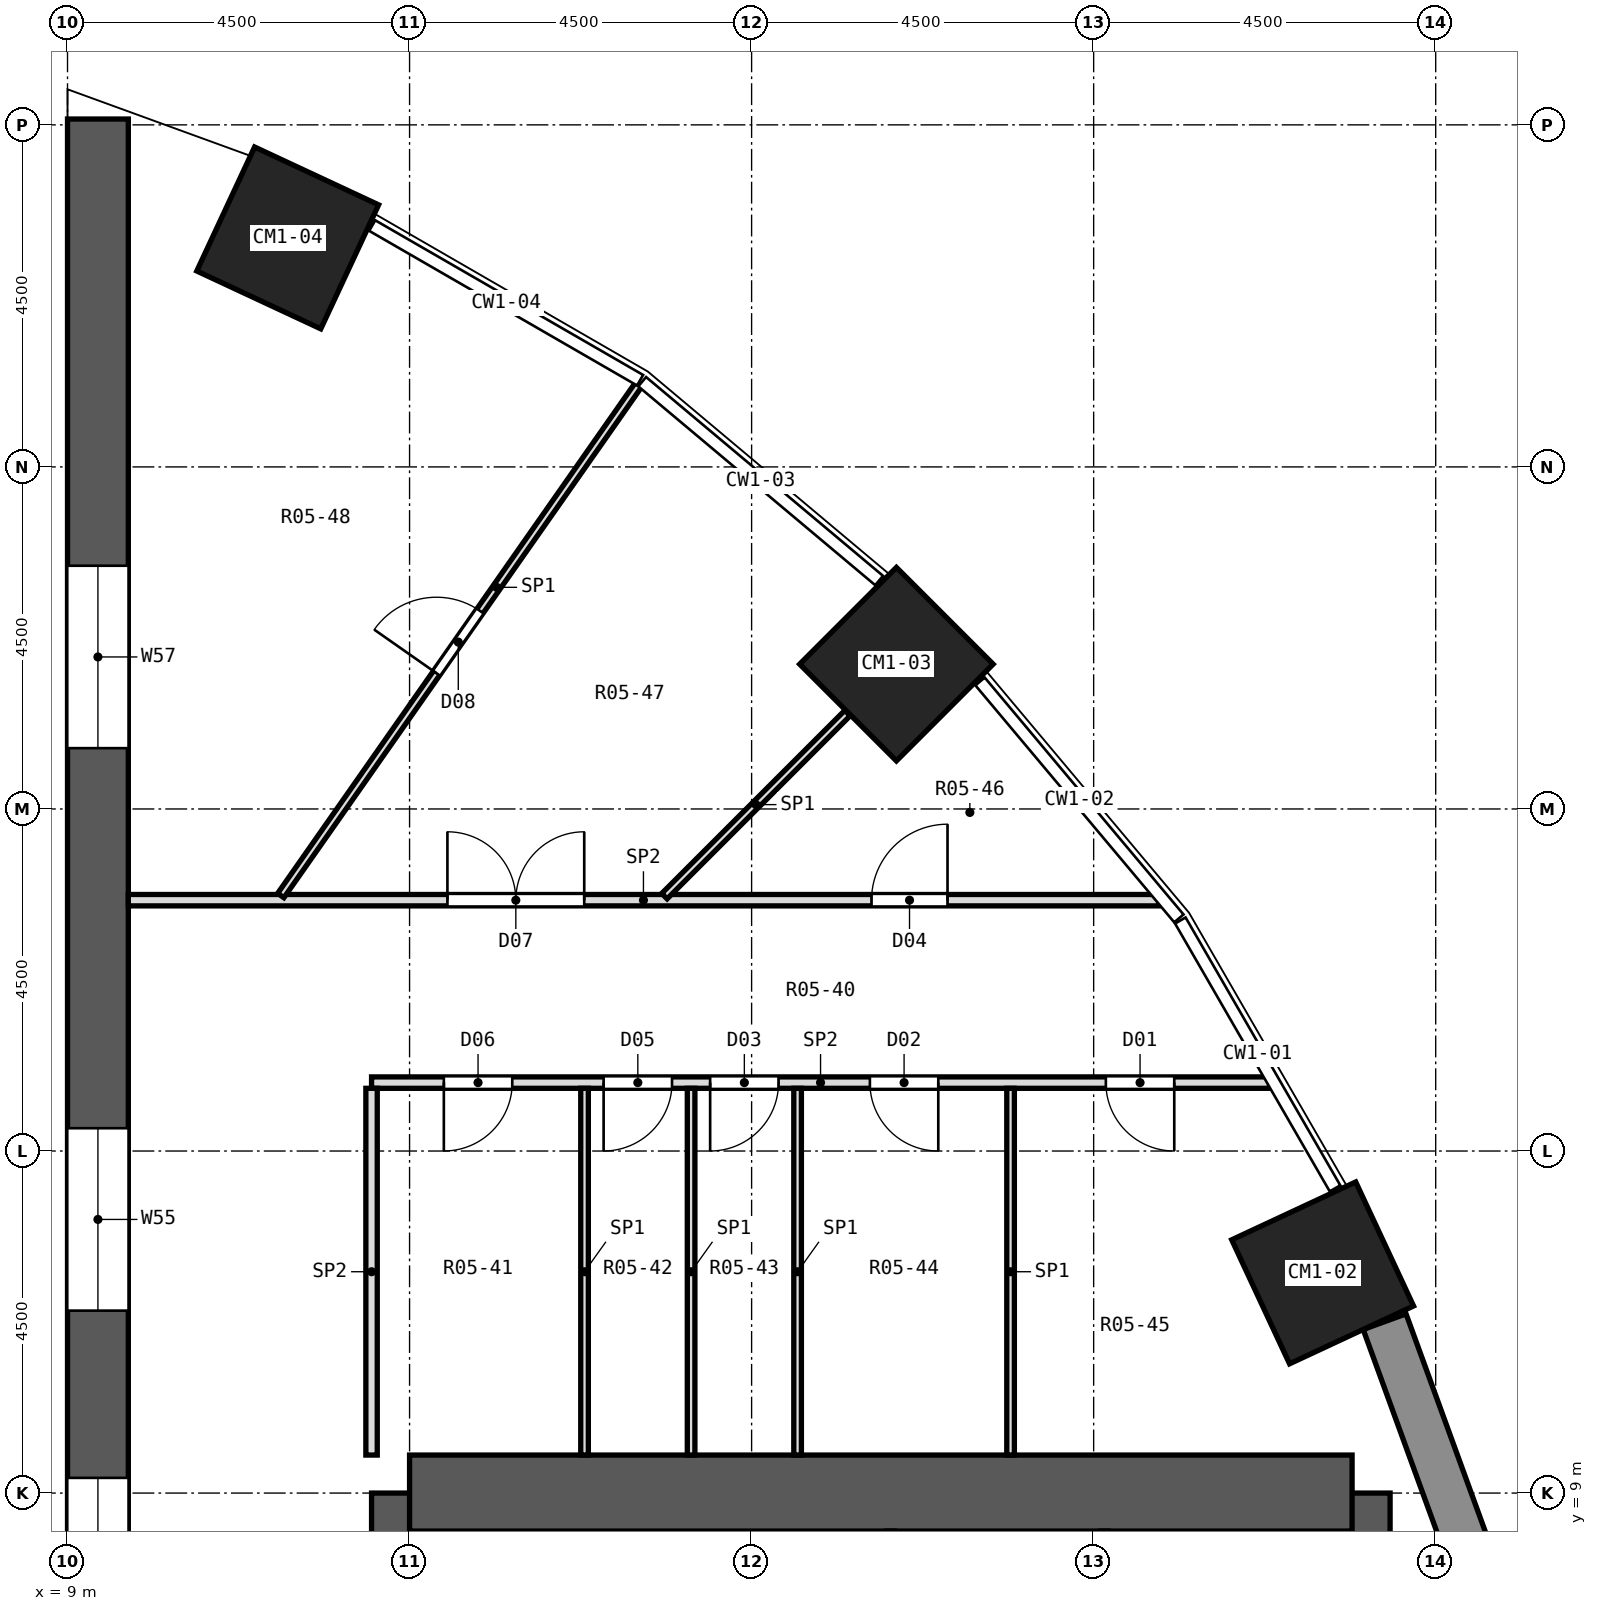
"""IFC4 building model, lengths in metres.
Left out: names, types, materials, properties, quantities, classifications, styles, units other than length and angle.
Written with IfcOpenShell. Run it as: python <this file> out.ifc"""

import sys

from ifc_helpers import new_model, si_unit, direction, frame, frame_2d, origin, origin_2d, place, context, subcontext, project, spatial, polyline, rectangle, outline, extrude, element, fill, save


model = new_model("IFC4")
c1 = context("Model", 3, precision=1e-05, world=origin(), true_north=direction((0.0, 1.0)))
c2 = subcontext(c1, "Body", "Model", "MODEL_VIEW")
j1 = project(units=[si_unit("LENGTHUNIT", "METRE"), si_unit("PLANEANGLEUNIT", "RADIAN")], contexts=[c1])
p1 = place(None, origin())
s1 = spatial("IfcSite", under=j1, at=p1, CompositionType="ELEMENT")
p2 = place(p1, origin())
s2 = spatial("IfcBuilding", under=s1, at=p2, CompositionType="ELEMENT")
p3 = place(p2, frame((0.0, 0.0, 9.2)))
s3 = spatial("IfcBuildingStorey", under=s2, at=p3, CompositionType="ELEMENT", Elevation=9.2)
for number, where, z_axis, x_axis in (
    (1, (25.512, 11.897, 0.0), (0.0, 0.0, 1.0), (0.906, 0.423, 0.0)),
    (2, (19.905, 19.905, 0.0), (0.0, 0.0, 1.0), (0.707, 0.707, 0.0)),
    (3, (11.897, 25.512, 0.0), (0.0, 0.0, 1.0), (0.423, 0.906, 0.0)),
):
    element("IfcColumn", number, at=place(p3, frame(where, z_axis=z_axis, x_axis=x_axis)), inside=s3, PredefinedType="COLUMN", context=c2, shape_type="SweptSolid", body=[
        extrude(rectangle(XDim=1.8, YDim=1.8, at=origin_2d()), origin(), (0.0, 0.0, 1.0), 4.2),
    ])
p4 = place(p3, frame((13.5, -9.0, 0.0), z_axis=(0.0, 0.0, 1.0), x_axis=(0.0, 1.0, 0.0)))
e4 = element("IfcWall", 4, at=p4, inside=s3, PredefinedType="SHEAR", context=c2, shape_type="SweptSolid", body=[
    extrude(rectangle(XDim=18.0, YDim=1.0, at=frame_2d((9.0, 0.0))), origin(), (0.0, 0.0, 1.0), 4.2),
])
p5 = place(p4, frame((15.4, 0.0, 0.0)))
e5 = element("IfcOpeningElement", 5, at=p5, cuts=e4, PredefinedType="OPENING", context=c2, shape_type="SweptSolid", body=[
    extrude(rectangle(XDim=1.2, YDim=2.1, at=frame_2d((0.6, 1.05))), frame((0.0, 0.512, 0.0), z_axis=(0.0, -1.0, 0.0), x_axis=(1.0, 0.0, 0.0)), (0.0, 0.0, 1.0), 1.024),
])
p6 = place(p4, frame((1.4, 0.0, 0.0)))
e6 = element("IfcOpeningElement", 6, at=p6, cuts=e4, PredefinedType="OPENING", context=c2, shape_type="SweptSolid", body=[
    extrude(rectangle(XDim=1.2, YDim=2.1, at=frame_2d((0.6, 1.05))), frame((0.0, 0.512, 0.0), z_axis=(0.0, -1.0, 0.0), x_axis=(1.0, 0.0, 0.0)), (0.0, 0.0, 1.0), 1.024),
])
p7 = place(p4, frame((7.5, 0.0, 0.0)))
e7 = element("IfcOpeningElement", 7, at=p7, cuts=e4, PredefinedType="OPENING", context=c2, shape_type="SweptSolid", body=[
    extrude(rectangle(XDim=3.0, YDim=2.4, at=frame_2d((1.5, 1.2))), frame((0.0, 0.512, 0.0), z_axis=(0.0, -1.0, 0.0), x_axis=(1.0, 0.0, 0.0)), (0.0, 0.0, 1.0), 1.024),
])
p8 = place(p3, frame((25.9, -9.0, 0.0), z_axis=(0.0, 0.0, 1.0), x_axis=(0.0, 1.0, 0.0)))
e8 = element("IfcWall", 8, at=p8, inside=s3, PredefinedType="SHEAR", context=c2, shape_type="SweptSolid", body=[
    extrude(rectangle(XDim=18.0, YDim=1.0, at=frame_2d((9.0, 0.0))), origin(), (0.0, 0.0, 1.0), 4.2),
])
p9 = place(p3, frame((13.5, 9.0, 0.0), z_axis=(0.0, 0.0, 1.0), x_axis=(1.0, 0.0, 0.0)))
e9 = element("IfcWall", 9, at=p9, inside=s3, PredefinedType="SHEAR", context=c2, shape_type="SweptSolid", body=[
    extrude(rectangle(XDim=12.4, YDim=1.0, at=frame_2d((6.2, 0.0))), origin(), (0.0, 0.0, 1.0), 4.2),
])
p10 = place(p3, frame((9.4, -27.077, 0.0), z_axis=(0.0, 0.0, 1.0), x_axis=(0.0, 1.0, 0.0)))
e10 = element("IfcWall", 10, at=p10, inside=s3, PredefinedType="SHEAR", context=c2, shape_type="SweptSolid", body=[
    extrude(rectangle(XDim=54.154, YDim=0.8, at=frame_2d((27.077, 0.0))), origin(), (0.0, 0.0, 1.0), 4.2),
])
p11 = place(p10, frame((13.277, 0.0, 0.9)))
e11 = element("IfcOpeningElement", 11, at=p11, cuts=e10, PredefinedType="OPENING", context=c2, shape_type="SweptSolid", body=[
    extrude(rectangle(XDim=2.4, YDim=2.1, at=frame_2d((1.2, 1.05))), frame((0.0, 0.412, 0.0), z_axis=(0.0, -1.0, 0.0), x_axis=(1.0, 0.0, 0.0)), (0.0, 0.0, 1.0), 0.824),
])
p12 = place(p10, frame((17.877, 0.0, 0.9)))
e12 = element("IfcOpeningElement", 12, at=p12, cuts=e10, PredefinedType="OPENING", context=c2, shape_type="SweptSolid", body=[
    extrude(rectangle(XDim=2.4, YDim=2.1, at=frame_2d((1.2, 1.05))), frame((0.0, 0.412, 0.0), z_axis=(0.0, -1.0, 0.0), x_axis=(1.0, 0.0, 0.0)), (0.0, 0.0, 1.0), 0.824),
])
p13 = place(p10, frame((22.477, 0.0, 0.9)))
e13 = element("IfcOpeningElement", 13, at=p13, cuts=e10, PredefinedType="OPENING", context=c2, shape_type="SweptSolid", body=[
    extrude(rectangle(XDim=2.4, YDim=2.1, at=frame_2d((1.2, 1.05))), frame((0.0, 0.412, 0.0), z_axis=(0.0, -1.0, 0.0), x_axis=(1.0, 0.0, 0.0)), (0.0, 0.0, 1.0), 0.824),
])
p14 = place(p10, frame((29.277, 0.0, 0.9)))
e14 = element("IfcOpeningElement", 14, at=p14, cuts=e10, PredefinedType="OPENING", context=c2, shape_type="SweptSolid", body=[
    extrude(rectangle(XDim=2.4, YDim=2.1, at=frame_2d((1.2, 1.05))), frame((0.0, 0.412, 0.0), z_axis=(0.0, -1.0, 0.0), x_axis=(1.0, 0.0, 0.0)), (0.0, 0.0, 1.0), 0.824),
])
p15 = place(p10, frame((33.877, 0.0, 0.9)))
e15 = element("IfcOpeningElement", 15, at=p15, cuts=e10, PredefinedType="OPENING", context=c2, shape_type="SweptSolid", body=[
    extrude(rectangle(XDim=2.4, YDim=2.1, at=frame_2d((1.2, 1.05))), frame((0.0, 0.412, 0.0), z_axis=(0.0, -1.0, 0.0), x_axis=(1.0, 0.0, 0.0)), (0.0, 0.0, 1.0), 0.824),
])
p16 = place(p10, frame((38.477, 0.0, 0.9)))
e16 = element("IfcOpeningElement", 16, at=p16, cuts=e10, PredefinedType="OPENING", context=c2, shape_type="SweptSolid", body=[
    extrude(rectangle(XDim=2.4, YDim=2.1, at=frame_2d((1.2, 1.05))), frame((0.0, 0.412, 0.0), z_axis=(0.0, -1.0, 0.0), x_axis=(1.0, 0.0, 0.0)), (0.0, 0.0, 1.0), 0.824),
])
p17 = place(p10, frame((5.877, 0.0, 0.9)))
e17 = element("IfcOpeningElement", 17, at=p17, cuts=e10, PredefinedType="OPENING", context=c2, shape_type="SweptSolid", body=[
    extrude(rectangle(XDim=2.4, YDim=2.1, at=frame_2d((1.2, 1.05))), frame((0.0, 0.412, 0.0), z_axis=(0.0, -1.0, 0.0), x_axis=(1.0, 0.0, 0.0)), (0.0, 0.0, 1.0), 0.824),
])
p18 = place(p10, frame((45.877, 0.0, 0.9)))
e18 = element("IfcOpeningElement", 18, at=p18, cuts=e10, PredefinedType="OPENING", context=c2, shape_type="SweptSolid", body=[
    extrude(rectangle(XDim=2.4, YDim=2.1, at=frame_2d((1.2, 1.05))), frame((0.0, 0.412, 0.0), z_axis=(0.0, -1.0, 0.0), x_axis=(1.0, 0.0, 0.0)), (0.0, 0.0, 1.0), 0.824),
])
p19 = place(p3, frame((27.73, 7.403, 0.0), z_axis=(0.0, 0.0, 1.0), x_axis=(-0.342034744565, 0.939687306241, 0.0)))
e19 = element("IfcWall", 19, at=p19, inside=s3, PredefinedType="SOLIDWALL", context=c2, shape_type="SweptSolid", body=[
    extrude(rectangle(XDim=4.099, YDim=0.6, at=frame_2d((2.05, 0.0))), origin(), (0.0, 0.0, 1.0), 3.65),
])
p20 = place(p3, frame((11.634, 26.49, 0.0), z_axis=(0.342051555154, 0.93967909211, 0.001984305274), x_axis=(-0.000667381896, -0.001868746859, 0.999998031191)))
e20 = element("IfcWall", 20, at=p20, inside=s3, PredefinedType="SOLIDWALL", context=c2, shape_type="SweptSolid", body=[
    extrude(outline(polyline([(0.0, 0.0), (3.65, -4.743e-20), (3.65, -2.81), (4.2, -2.81), (4.2, -3.467), (3.719, -3.211), (2.622, -2.727), (1.495, -2.328), (0.343, -2.015), (-2.335e-05, -1.949), (0.0, 0.0)])), origin(), (0.0, 0.0, -1.0), 0.38),
])
p21 = place(p3, frame((13.0, 14.4, 0.0), z_axis=(0.0, 0.0, 1.0), x_axis=(1.0, 0.0, 0.0)))
e21 = element("IfcWall", 21, at=p21, inside=s3, PredefinedType="PARTITIONING", context=c2, shape_type="SweptSolid", body=[
    extrude(rectangle(XDim=11.814, YDim=0.15, at=frame_2d((5.907, 0.0))), origin(), (0.0, 0.0, 1.0), 3.65),
])
p22 = place(p21, frame((9.66, 0.0, 0.0)))
e22 = element("IfcOpeningElement", 22, at=p22, cuts=e21, PredefinedType="OPENING", context=c2, shape_type="SweptSolid", body=[
    extrude(rectangle(XDim=0.9, YDim=2.1, at=frame_2d((0.45, 1.05))), frame((0.0, 0.087, 0.0), z_axis=(0.0, -1.0, 0.0), x_axis=(1.0, 0.0, 0.0)), (0.0, 0.0, 1.0), 0.174),
])
p23 = place(p21, frame((6.556, 0.0, 0.0)))
e23 = element("IfcOpeningElement", 23, at=p23, cuts=e21, PredefinedType="OPENING", context=c2, shape_type="SweptSolid", body=[
    extrude(rectangle(XDim=0.9, YDim=2.1, at=frame_2d((0.45, 1.05))), frame((0.0, 0.087, 0.0), z_axis=(0.0, -1.0, 0.0), x_axis=(1.0, 0.0, 0.0)), (0.0, 0.0, 1.0), 0.174),
])
p24 = place(p21, frame((4.455, 0.0, 0.0)))
e24 = element("IfcOpeningElement", 24, at=p24, cuts=e21, PredefinedType="OPENING", context=c2, shape_type="SweptSolid", body=[
    extrude(rectangle(XDim=0.9, YDim=2.1, at=frame_2d((0.45, 1.05))), frame((0.0, 0.087, 0.0), z_axis=(0.0, -1.0, 0.0), x_axis=(1.0, 0.0, 0.0)), (0.0, 0.0, 1.0), 0.174),
])
p25 = place(p21, frame((3.053, 0.0, 0.0)))
e25 = element("IfcOpeningElement", 25, at=p25, cuts=e21, PredefinedType="OPENING", context=c2, shape_type="SweptSolid", body=[
    extrude(rectangle(XDim=0.9, YDim=2.1, at=frame_2d((0.45, 1.05))), frame((0.0, 0.087, 0.0), z_axis=(0.0, -1.0, 0.0), x_axis=(1.0, 0.0, 0.0)), (0.0, 0.0, 1.0), 0.174),
])
p26 = place(p21, frame((0.951, 0.0, 0.0)))
e26 = element("IfcOpeningElement", 26, at=p26, cuts=e21, PredefinedType="OPENING", context=c2, shape_type="SweptSolid", body=[
    extrude(rectangle(XDim=0.9, YDim=2.1, at=frame_2d((0.45, 1.05))), frame((0.0, 0.087, 0.0), z_axis=(0.0, -1.0, 0.0), x_axis=(1.0, 0.0, 0.0)), (0.0, 0.0, 1.0), 0.174),
])
p27 = place(p3, frame((9.8, 16.8, 0.0), z_axis=(0.0, 0.0, 1.0), x_axis=(1.0, 0.0, 0.0)))
e27 = element("IfcWall", 27, at=p27, inside=s3, PredefinedType="PARTITIONING", context=c2, shape_type="SweptSolid", body=[
    extrude(rectangle(XDim=13.555, YDim=0.15, at=frame_2d((6.777, 0.0))), origin(), (0.0, 0.0, 1.0), 3.65),
])
p28 = place(p27, frame((9.778, 0.0, 0.0)))
e28 = element("IfcOpeningElement", 28, at=p28, cuts=e27, PredefinedType="OPENING", context=c2, shape_type="SweptSolid", body=[
    extrude(rectangle(XDim=1.0, YDim=2.1, at=frame_2d((0.5, 1.05))), frame((0.0, 0.087, 0.0), z_axis=(0.0, -1.0, 0.0), x_axis=(1.0, 0.0, 0.0)), (0.0, 0.0, 1.0), 0.174),
])
p29 = place(p27, frame((4.198, 0.0, 0.0)))
e29 = element("IfcOpeningElement", 29, at=p29, cuts=e27, PredefinedType="OPENING", context=c2, shape_type="SweptSolid", body=[
    extrude(rectangle(XDim=1.8, YDim=2.1, at=frame_2d((0.9, 1.05))), frame((0.0, 0.087, 0.0), z_axis=(0.0, -1.0, 0.0), x_axis=(1.0, 0.0, 0.0)), (0.0, 0.0, 1.0), 0.174),
])
p30 = place(p3, frame((16.853, 16.853, 0.0), z_axis=(0.0, 0.0, 1.0), x_axis=(0.707106781187, 0.707106781187, 0.0)))
e30 = element("IfcWall", 30, at=p30, inside=s3, PredefinedType="PARTITIONING", context=c2, shape_type="SweptSolid", body=[
    extrude(rectangle(XDim=3.406, YDim=0.1, at=frame_2d((1.703, 0.0))), origin(), (0.0, 0.0, 1.0), 3.65),
])
p31 = place(p3, frame((11.806, 16.861, 0.0), z_axis=(0.0, 0.0, 1.0), x_axis=(0.573651788308, 0.819099277115, 0.0)))
e31 = element("IfcWall", 31, at=p31, inside=s3, PredefinedType="PARTITIONING", context=c2, shape_type="SweptSolid", body=[
    extrude(rectangle(XDim=8.216, YDim=0.1, at=frame_2d((4.108, 0.0))), origin(), (0.0, 0.0, 1.0), 3.65),
])
p32 = place(p31, frame((3.57, 0.0, 0.0)))
e32 = element("IfcOpeningElement", 32, at=p32, cuts=e31, PredefinedType="OPENING", context=c2, shape_type="SweptSolid", body=[
    extrude(rectangle(XDim=1.0, YDim=2.1, at=frame_2d((0.5, 1.05))), frame((0.0, 0.062, 0.0), z_axis=(0.0, -1.0, 0.0), x_axis=(1.0, 0.0, 0.0)), (0.0, 0.0, 1.0), 0.124),
])
for number, where, z_axis, x_axis in (
    (33, (21.407, 9.5, 0.0), (0.0, 0.0, 1.0), (0.0, 1.0, 0.0)),
    (34, (18.605, 9.5, 0.0), (0.0, 0.0, 1.0), (0.0, 1.0, 0.0)),
    (35, (17.204, 9.5, 0.0), (0.0, 0.0, 1.0), (0.0, 1.0, 0.0)),
    (36, (15.802, 9.5, 0.0), (0.0, 0.0, 1.0), (0.0, 1.0, 0.0)),
):
    element("IfcWall", number, at=place(p3, frame(where, z_axis=z_axis, x_axis=x_axis)), inside=s3, PredefinedType="PARTITIONING", context=c2, shape_type="SweptSolid", body=[
        extrude(rectangle(XDim=4.825, YDim=0.1, at=frame_2d((2.413, 0.0))), origin(), (0.0, 0.0, 1.0), 3.65),
    ])
p33 = place(p3, frame((13.0, 9.5, 0.0), z_axis=(0.0, 0.0, 1.0), x_axis=(0.0, 1.0, 0.0)))
e37 = element("IfcWall", 37, at=p33, inside=s3, PredefinedType="PARTITIONING", context=c2, shape_type="SweptSolid", body=[
    extrude(rectangle(XDim=4.825, YDim=0.15, at=frame_2d((2.413, 0.0))), origin(), (0.0, 0.0, 1.0), 3.65),
])
p34 = place(p3, frame((19.83, 5.3, 0.0), z_axis=(0.0, 0.0, 1.0), x_axis=(0.0, 1.0, 0.0)))
e38 = element("IfcWall", 38, at=p34, inside=s3, PredefinedType="PARTITIONING", context=c2, shape_type="SweptSolid", body=[
    extrude(rectangle(XDim=3.2, YDim=0.1, at=frame_2d((1.6, 0.0))), origin(), (0.0, 0.0, 1.0), 3.65),
])
p35 = place(p3, frame((22.64, 5.3, 0.0), z_axis=(0.0, 0.0, 1.0), x_axis=(0.0, 1.0, 0.0)))
e39 = element("IfcWall", 39, at=p35, inside=s3, PredefinedType="PARTITIONING", context=c2, shape_type="SweptSolid", body=[
    extrude(rectangle(XDim=3.2, YDim=0.1, at=frame_2d((1.6, 0.0))), origin(), (0.0, 0.0, 1.0), 3.65),
])
p36 = place(p35, frame((1.15, 0.0, 0.0)))
e40 = element("IfcOpeningElement", 40, at=p36, cuts=e39, PredefinedType="OPENING", context=c2, shape_type="SweptSolid", body=[
    extrude(rectangle(XDim=0.9, YDim=2.1, at=frame_2d((0.45, 1.05))), frame((0.0, 0.062, 0.0), z_axis=(0.0, -1.0, 0.0), x_axis=(1.0, 0.0, 0.0)), (0.0, 0.0, 1.0), 0.124),
])
p37 = place(p22, frame((0.9, 0.0, 0.0), z_axis=(0.0, 0.0, 1.0), x_axis=(-1.0, 0.0, 0.0)))
e41 = element("IfcDoor", 41, at=p37, inside=s3, OperationType="SINGLE_SWING_LEFT", PredefinedType="DOOR", context=c2, shape_type="SweptSolid", body=[
    extrude(rectangle(XDim=0.9, YDim=2.1, at=frame_2d((0.45, 1.05))), frame((0.0, 0.025, 0.0), z_axis=(0.0, -1.0, 0.0), x_axis=(1.0, 0.0, 0.0)), (0.0, 0.0, 1.0), 0.05),
])
fill(e22, e41)
p38 = place(p23, frame((0.9, 0.0, 0.0), z_axis=(0.0, 0.0, 1.0), x_axis=(-1.0, 0.0, 0.0)))
e42 = element("IfcDoor", 42, at=p38, inside=s3, OperationType="SINGLE_SWING_LEFT", PredefinedType="DOOR", context=c2, shape_type="SweptSolid", body=[
    extrude(rectangle(XDim=0.9, YDim=2.1, at=frame_2d((0.45, 1.05))), frame((0.0, 0.025, 0.0), z_axis=(0.0, -1.0, 0.0), x_axis=(1.0, 0.0, 0.0)), (0.0, 0.0, 1.0), 0.05),
])
fill(e23, e42)
p39 = place(p24, frame((0.9, 0.0, 0.0), z_axis=(0.0, 0.0, 1.0), x_axis=(-1.0, 0.0, 0.0)))
e43 = element("IfcDoor", 43, at=p39, inside=s3, OperationType="SINGLE_SWING_RIGHT", PredefinedType="DOOR", context=c2, shape_type="SweptSolid", body=[
    extrude(rectangle(XDim=0.9, YDim=2.1, at=frame_2d((0.45, 1.05))), frame((0.0, 0.025, 0.0), z_axis=(0.0, -1.0, 0.0), x_axis=(1.0, 0.0, 0.0)), (0.0, 0.0, 1.0), 0.05),
])
fill(e24, e43)
p40 = place(p28, origin())
e44 = element("IfcDoor", 44, at=p40, inside=s3, OperationType="SINGLE_SWING_RIGHT", PredefinedType="DOOR", context=c2, shape_type="SweptSolid", body=[
    extrude(rectangle(XDim=1.0, YDim=2.1, at=frame_2d((0.5, 1.05))), frame((0.0, 0.025, 0.0), z_axis=(0.0, -1.0, 0.0), x_axis=(1.0, 0.0, 0.0)), (0.0, 0.0, 1.0), 0.05),
])
fill(e28, e44)
p41 = place(p25, frame((0.9, 0.0, 0.0), z_axis=(0.0, 0.0, 1.0), x_axis=(-1.0, 0.0, 0.0)))
e45 = element("IfcDoor", 45, at=p41, inside=s3, OperationType="SINGLE_SWING_RIGHT", PredefinedType="DOOR", context=c2, shape_type="SweptSolid", body=[
    extrude(rectangle(XDim=0.9, YDim=2.1, at=frame_2d((0.45, 1.05))), frame((0.0, 0.025, 0.0), z_axis=(0.0, -1.0, 0.0), x_axis=(1.0, 0.0, 0.0)), (0.0, 0.0, 1.0), 0.05),
])
fill(e25, e45)
p42 = place(p26, frame((0.9, 0.0, 0.0), z_axis=(0.0, 0.0, 1.0), x_axis=(-1.0, 0.0, 0.0)))
e46 = element("IfcDoor", 46, at=p42, inside=s3, OperationType="SINGLE_SWING_RIGHT", PredefinedType="DOOR", context=c2, shape_type="SweptSolid", body=[
    extrude(rectangle(XDim=0.9, YDim=2.1, at=frame_2d((0.45, 1.05))), frame((0.0, 0.025, 0.0), z_axis=(0.0, -1.0, 0.0), x_axis=(1.0, 0.0, 0.0)), (0.0, 0.0, 1.0), 0.05),
])
fill(e26, e46)
p43 = place(p29, origin())
e47 = element("IfcDoor", 47, at=p43, inside=s3, OperationType="DOUBLE_DOOR_SINGLE_SWING", PredefinedType="DOOR", context=c2, shape_type="SweptSolid", body=[
    extrude(rectangle(XDim=1.8, YDim=2.1, at=frame_2d((0.9, 1.05))), frame((0.0, 0.025, 0.0), z_axis=(0.0, -1.0, 0.0), x_axis=(1.0, 0.0, 0.0)), (0.0, 0.0, 1.0), 0.05),
])
fill(e29, e47)
p44 = place(p32, origin())
e48 = element("IfcDoor", 48, at=p44, inside=s3, OperationType="SINGLE_SWING_LEFT", PredefinedType="DOOR", context=c2, shape_type="SweptSolid", body=[
    extrude(rectangle(XDim=1.0, YDim=2.1, at=frame_2d((0.5, 1.05))), frame((0.0, 0.025, 0.0), z_axis=(0.0, -1.0, 0.0), x_axis=(1.0, 0.0, 0.0)), (0.0, 0.0, 1.0), 0.05),
])
fill(e32, e48)
p45 = place(p15, origin())
e49 = element("IfcWindow", 49, at=p45, inside=s3, PartitioningType="SINGLE_PANEL", PredefinedType="WINDOW", context=c2, shape_type="SweptSolid", body=[
    extrude(rectangle(XDim=2.4, YDim=2.1, at=frame_2d((1.2, 1.05))), frame((0.0, 0.03, 0.0), z_axis=(0.0, -1.0, 0.0), x_axis=(1.0, 0.0, 0.0)), (0.0, 0.0, 1.0), 0.06),
])
fill(e15, e49)
p46 = place(p16, origin())
e50 = element("IfcWindow", 50, at=p46, inside=s3, PartitioningType="SINGLE_PANEL", PredefinedType="WINDOW", context=c2, shape_type="SweptSolid", body=[
    extrude(rectangle(XDim=2.4, YDim=2.1, at=frame_2d((1.2, 1.05))), frame((0.0, 0.03, 0.0), z_axis=(0.0, -1.0, 0.0), x_axis=(1.0, 0.0, 0.0)), (0.0, 0.0, 1.0), 0.06),
])
fill(e16, e50)
p47 = place(p18, origin())
e51 = element("IfcWindow", 51, at=p47, inside=s3, PartitioningType="SINGLE_PANEL", PredefinedType="WINDOW", context=c2, shape_type="SweptSolid", body=[
    extrude(rectangle(XDim=2.4, YDim=2.1, at=frame_2d((1.2, 1.05))), frame((0.0, 0.03, 0.0), z_axis=(0.0, -1.0, 0.0), x_axis=(1.0, 0.0, 0.0)), (0.0, 0.0, 1.0), 0.06),
])
fill(e18, e51)
save(model, sys.argv[1])
